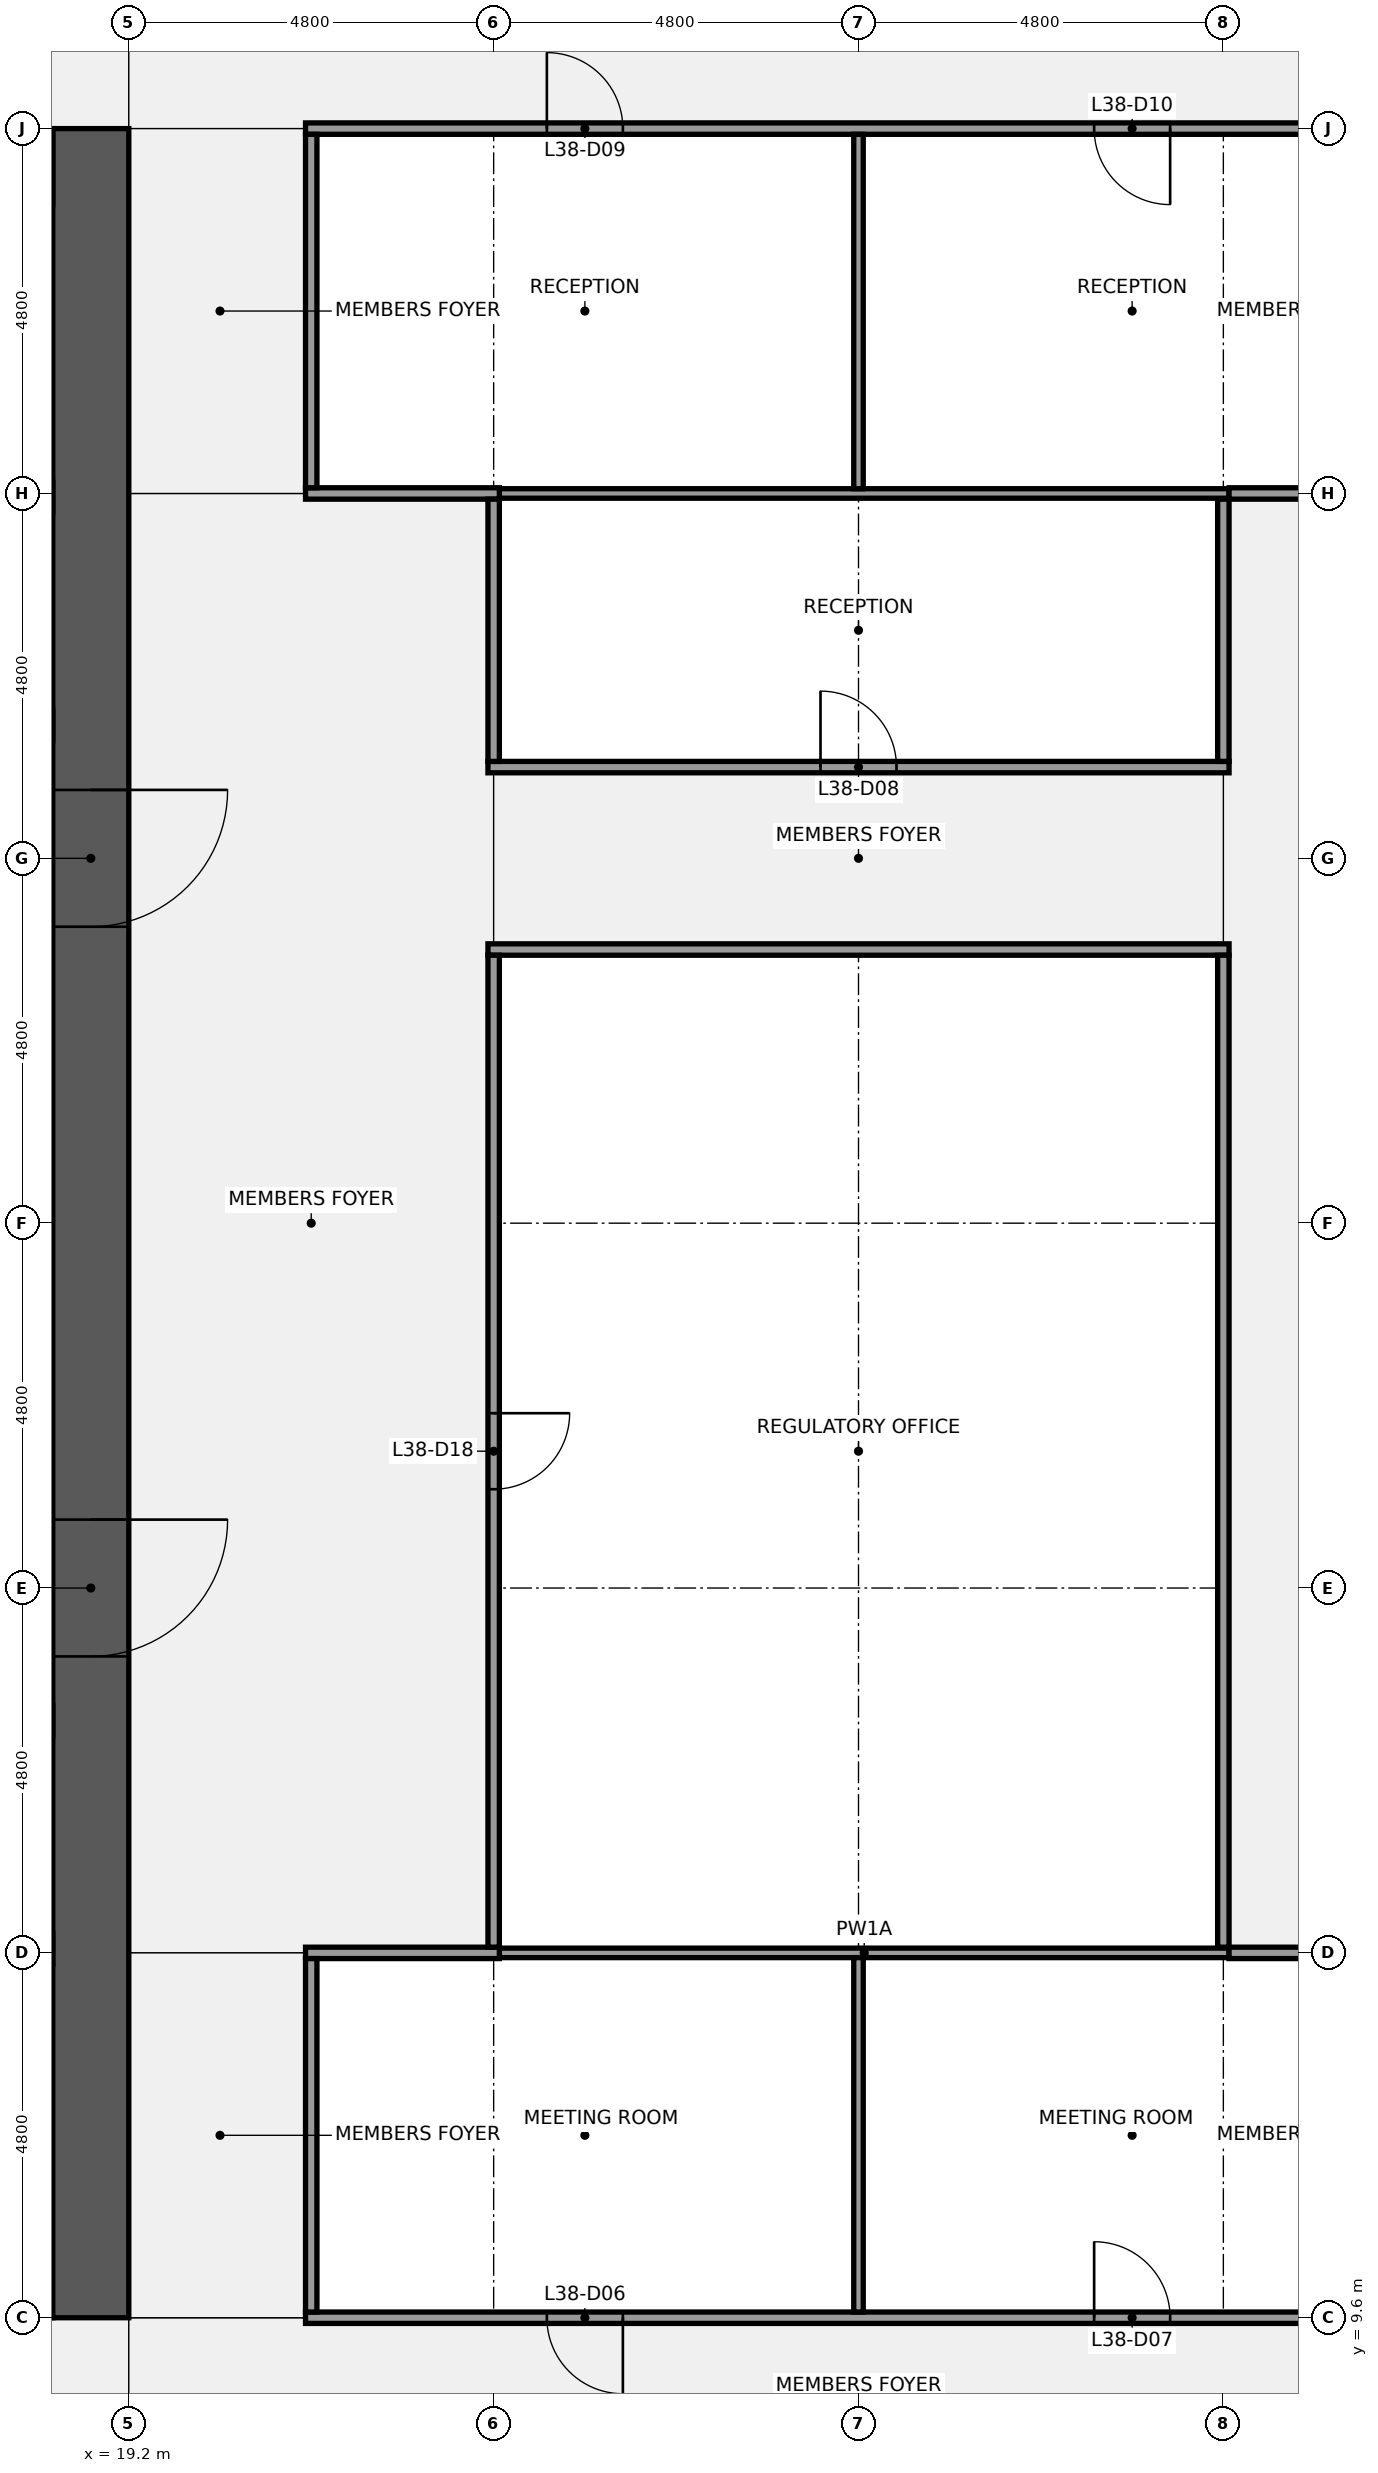
"""IFC4 building model, lengths in metres.
Left out: names, types, materials, properties, quantities, classifications, styles, units other than length and angle.
Written with IfcOpenShell. Run it as: python <this file> out.ifc"""

import sys

from ifc_helpers import new_model, si_unit, direction, frame, frame_2d, origin, place, context, subcontext, project, spatial, rectangle, extrude, element, fill, save


model = new_model("IFC4")
c1 = context("Model", 3, precision=1e-05, world=origin(), true_north=direction((0.0, 1.0)))
c2 = subcontext(c1, "Body", "Model", "MODEL_VIEW")
j1 = project(units=[si_unit("LENGTHUNIT", "METRE"), si_unit("PLANEANGLEUNIT", "RADIAN")], contexts=[c1])
p1 = place(None, origin())
s1 = spatial("IfcSite", under=j1, at=p1, CompositionType="ELEMENT")
p2 = place(p1, origin())
s2 = spatial("IfcBuilding", under=s1, at=p2, CompositionType="ELEMENT")
p3 = place(p2, frame((0.0, 0.0, 172.1)))
s3 = spatial("IfcBuildingStorey", under=s2, at=p3, CompositionType="ELEMENT", Elevation=172.1)
p4 = place(p3, frame((18.2, 10.1, 0.0), z_axis=(0.0, 0.0, 1.0), x_axis=(-1.0, 0.0, 0.0)))
e1 = element("IfcWall", 1, at=p4, inside=s3, PredefinedType="SHEAR", context=c2, shape_type="SweptSolid", body=[
    extrude(rectangle(XDim=8.6, YDim=1.0, at=frame_2d((4.3, 0.0))), origin(), (0.0, 0.0, 1.0), 3.7),
])
p5 = place(p4, frame((0.85, 0.0, 0.0)))
e2 = element("IfcOpeningElement", 2, at=p5, cuts=e1, PredefinedType="OPENING", context=c2, shape_type="SweptSolid", body=[
    extrude(rectangle(XDim=1.1, YDim=2.1, at=frame_2d((0.55, 1.05))), frame((0.0, 0.51, 0.0), z_axis=(0.0, -1.0, 0.0), x_axis=(1.0, 0.0, 0.0)), (0.0, 0.0, 1.0), 1.02),
])
p6 = place(p3, frame((18.7, 38.4, 0.0), z_axis=(0.0, 0.0, 1.0), x_axis=(0.0, -1.0, 0.0)))
e3 = element("IfcWall", 3, at=p6, inside=s3, PredefinedType="SHEAR", context=c2, shape_type="SweptSolid", body=[
    extrude(rectangle(XDim=28.8, YDim=1.0, at=frame_2d((14.4, 0.0))), origin(), (0.0, 0.0, 1.0), 3.7),
])
p7 = place(p6, frame((18.3, 0.0, 0.0)))
e4 = element("IfcOpeningElement", 4, at=p7, cuts=e3, PredefinedType="OPENING", context=c2, shape_type="SweptSolid", body=[
    extrude(rectangle(XDim=1.8, YDim=2.1, at=frame_2d((0.9, 1.05))), frame((0.0, 0.51, 0.0), z_axis=(0.0, -1.0, 0.0), x_axis=(1.0, 0.0, 0.0)), (0.0, 0.0, 1.0), 1.02),
])
p8 = place(p6, frame((8.7, 0.0, 0.0)))
e5 = element("IfcOpeningElement", 5, at=p8, cuts=e3, PredefinedType="OPENING", context=c2, shape_type="SweptSolid", body=[
    extrude(rectangle(XDim=1.8, YDim=2.1, at=frame_2d((0.9, 1.05))), frame((0.0, 0.51, 0.0), z_axis=(0.0, -1.0, 0.0), x_axis=(1.0, 0.0, 0.0)), (0.0, 0.0, 1.0), 1.02),
])
p9 = place(p3, frame((1.0, 14.45, 0.0), z_axis=(0.0, 0.0, 1.0), x_axis=(1.0, 0.0, 0.0)))
e6 = element("IfcWall", 6, at=p9, inside=s3, PredefinedType="SHEAR", context=c2, shape_type="SweptSolid", body=[
    extrude(rectangle(XDim=17.2, YDim=0.4, at=frame_2d((8.6, 0.0))), origin(), (0.0, 0.0, 1.0), 3.7),
])
p10 = place(p3, frame((1.0, 17.45, 0.0), z_axis=(0.0, 0.0, 1.0), x_axis=(1.0, 0.0, 0.0)))
e7 = element("IfcWall", 7, at=p10, inside=s3, PredefinedType="SHEAR", context=c2, shape_type="SweptSolid", body=[
    extrude(rectangle(XDim=17.2, YDim=0.4, at=frame_2d((8.6, 0.0))), origin(), (0.0, 0.0, 1.0), 3.7),
])
p11 = place(p10, frame((1.062, 0.0, 0.0)))
e8 = element("IfcOpeningElement", 8, at=p11, cuts=e7, PredefinedType="OPENING", context=c2, shape_type="SweptSolid", body=[
    extrude(rectangle(XDim=1.0, YDim=2.1, at=frame_2d((0.5, 1.05))), frame((0.0, 0.21, 0.0), z_axis=(0.0, -1.0, 0.0), x_axis=(1.0, 0.0, 0.0)), (0.0, 0.0, 1.0), 0.42),
])
p12 = place(p10, frame((6.9, 0.0, 0.0)))
e9 = element("IfcOpeningElement", 9, at=p12, cuts=e7, PredefinedType="OPENING", context=c2, shape_type="SweptSolid", body=[
    extrude(rectangle(XDim=1.0, YDim=2.1, at=frame_2d((0.5, 1.05))), frame((0.0, 0.21, 0.0), z_axis=(0.0, -1.0, 0.0), x_axis=(1.0, 0.0, 0.0)), (0.0, 0.0, 1.0), 0.42),
])
p13 = place(p10, frame((13.938, 0.0, 0.0)))
e10 = element("IfcOpeningElement", 10, at=p13, cuts=e7, PredefinedType="OPENING", context=c2, shape_type="SweptSolid", body=[
    extrude(rectangle(XDim=1.0, YDim=2.1, at=frame_2d((0.5, 1.05))), frame((0.0, 0.21, 0.0), z_axis=(0.0, -1.0, 0.0), x_axis=(1.0, 0.0, 0.0)), (0.0, 0.0, 1.0), 0.42),
])
p14 = place(p3, frame((1.0, 30.55, 0.0), z_axis=(0.0, 0.0, 1.0), x_axis=(1.0, 0.0, 0.0)))
e11 = element("IfcWall", 11, at=p14, inside=s3, PredefinedType="SHEAR", context=c2, shape_type="SweptSolid", body=[
    extrude(rectangle(XDim=17.2, YDim=0.4, at=frame_2d((8.6, 0.0))), origin(), (0.0, 0.0, 1.0), 3.7),
])
p15 = place(p14, frame((1.962, 0.0, 0.0)))
e12 = element("IfcOpeningElement", 12, at=p15, cuts=e11, PredefinedType="OPENING", context=c2, shape_type="SweptSolid", body=[
    extrude(rectangle(XDim=1.0, YDim=2.1, at=frame_2d((0.5, 1.05))), frame((0.0, 0.21, 0.0), z_axis=(0.0, -1.0, 0.0), x_axis=(1.0, 0.0, 0.0)), (0.0, 0.0, 1.0), 0.42),
])
p16 = place(p14, frame((5.7, 0.0, 0.0)))
e13 = element("IfcOpeningElement", 13, at=p16, cuts=e11, PredefinedType="OPENING", context=c2, shape_type="SweptSolid", body=[
    extrude(rectangle(XDim=1.0, YDim=2.1, at=frame_2d((0.5, 1.05))), frame((0.0, 0.21, 0.0), z_axis=(0.0, -1.0, 0.0), x_axis=(1.0, 0.0, 0.0)), (0.0, 0.0, 1.0), 0.42),
])
p17 = place(p14, frame((8.1, 0.0, 0.0)))
e14 = element("IfcOpeningElement", 14, at=p17, cuts=e11, PredefinedType="OPENING", context=c2, shape_type="SweptSolid", body=[
    extrude(rectangle(XDim=1.0, YDim=2.1, at=frame_2d((0.5, 1.05))), frame((0.0, 0.21, 0.0), z_axis=(0.0, -1.0, 0.0), x_axis=(1.0, 0.0, 0.0)), (0.0, 0.0, 1.0), 0.42),
])
p18 = place(p14, frame((13.038, 0.0, 0.0)))
e15 = element("IfcOpeningElement", 15, at=p18, cuts=e11, PredefinedType="OPENING", context=c2, shape_type="SweptSolid", body=[
    extrude(rectangle(XDim=1.0, YDim=2.1, at=frame_2d((0.5, 1.05))), frame((0.0, 0.21, 0.0), z_axis=(0.0, -1.0, 0.0), x_axis=(1.0, 0.0, 0.0)), (0.0, 0.0, 1.0), 0.42),
])
p19 = place(p3, frame((1.0, 33.55, 0.0), z_axis=(0.0, 0.0, 1.0), x_axis=(1.0, 0.0, 0.0)))
e16 = element("IfcWall", 16, at=p19, inside=s3, PredefinedType="SHEAR", context=c2, shape_type="SweptSolid", body=[
    extrude(rectangle(XDim=17.2, YDim=0.4, at=frame_2d((8.6, 0.0))), origin(), (0.0, 0.0, 1.0), 3.7),
])
p20 = place(p3, frame((21.525, 9.6, 0.0), z_axis=(0.0, 0.0, 1.0), x_axis=(1.0, 0.0, 0.0)))
e17 = element("IfcWall", 17, at=p20, inside=s3, PredefinedType="PARTITIONING", context=c2, shape_type="SweptSolid", body=[
    extrude(rectangle(XDim=14.55, YDim=0.15, at=frame_2d((7.275, 0.0))), origin(), (0.0, 0.0, 1.0), 2.709),
])
p21 = place(p20, frame((3.175, 0.0, 0.0)))
e18 = element("IfcOpeningElement", 18, at=p21, cuts=e17, PredefinedType="OPENING", context=c2, shape_type="SweptSolid", body=[
    extrude(rectangle(XDim=1.0, YDim=2.1, at=frame_2d((0.5, 1.05))), frame((0.0, 0.085, 0.0), z_axis=(0.0, -1.0, 0.0), x_axis=(1.0, 0.0, 0.0)), (0.0, 0.0, 1.0), 0.17),
])
p22 = place(p20, frame((10.375, 0.0, 0.0)))
e19 = element("IfcOpeningElement", 19, at=p22, cuts=e17, PredefinedType="OPENING", context=c2, shape_type="SweptSolid", body=[
    extrude(rectangle(XDim=1.0, YDim=2.1, at=frame_2d((0.5, 1.05))), frame((0.0, 0.085, 0.0), z_axis=(0.0, -1.0, 0.0), x_axis=(1.0, 0.0, 0.0)), (0.0, 0.0, 1.0), 0.17),
])
p23 = place(p3, frame((24.075, 14.4, 0.0), z_axis=(0.0, 0.0, 1.0), x_axis=(1.0, 0.0, 0.0)))
e20 = element("IfcWall", 20, at=p23, inside=s3, PredefinedType="PARTITIONING", context=c2, shape_type="SweptSolid", body=[
    extrude(rectangle(XDim=9.6, YDim=0.125, at=frame_2d((4.8, 0.0))), origin(), (0.0, 0.0, 1.0), 2.709),
])
p24 = place(p3, frame((21.525, 14.4, 0.0), z_axis=(0.0, 0.0, 1.0), x_axis=(1.0, 0.0, 0.0)))
e21 = element("IfcWall", 21, at=p24, inside=s3, PredefinedType="PARTITIONING", context=c2, shape_type="SweptSolid", body=[
    extrude(rectangle(XDim=2.55, YDim=0.15, at=frame_2d((1.275, 0.0))), origin(), (0.0, 0.0, 1.0), 2.709),
])
p25 = place(p3, frame((33.675, 14.4, 0.0), z_axis=(0.0, 0.0, 1.0), x_axis=(1.0, 0.0, 0.0)))
e22 = element("IfcWall", 22, at=p25, inside=s3, PredefinedType="PARTITIONING", context=c2, shape_type="SweptSolid", body=[
    extrude(rectangle(XDim=2.4, YDim=0.15, at=frame_2d((1.2, 0.0))), origin(), (0.0, 0.0, 1.0), 2.709),
])
p26 = place(p3, frame((23.925, 27.6, 0.0), z_axis=(0.0, 0.0, 1.0), x_axis=(1.0, 0.0, 0.0)))
e23 = element("IfcWall", 23, at=p26, inside=s3, PredefinedType="PARTITIONING", context=c2, shape_type="SweptSolid", body=[
    extrude(rectangle(XDim=9.75, YDim=0.15, at=frame_2d((4.875, 0.0))), origin(), (0.0, 0.0, 1.0), 2.709),
])
p27 = place(p3, frame((23.925, 30.0, 0.0), z_axis=(0.0, 0.0, 1.0), x_axis=(1.0, 0.0, 0.0)))
e24 = element("IfcWall", 24, at=p27, inside=s3, PredefinedType="PARTITIONING", context=c2, shape_type="SweptSolid", body=[
    extrude(rectangle(XDim=9.75, YDim=0.15, at=frame_2d((4.875, 0.0))), origin(), (0.0, 0.0, 1.0), 2.709),
])
p28 = place(p27, frame((4.375, 0.0, 0.0)))
e25 = element("IfcOpeningElement", 25, at=p28, cuts=e24, PredefinedType="OPENING", context=c2, shape_type="SweptSolid", body=[
    extrude(rectangle(XDim=1.0, YDim=2.1, at=frame_2d((0.5, 1.05))), frame((0.0, 0.085, 0.0), z_axis=(0.0, -1.0, 0.0), x_axis=(1.0, 0.0, 0.0)), (0.0, 0.0, 1.0), 0.17),
])
p29 = place(p3, frame((24.075, 33.6, 0.0), z_axis=(0.0, 0.0, 1.0), x_axis=(1.0, 0.0, 0.0)))
e26 = element("IfcWall", 26, at=p29, inside=s3, PredefinedType="PARTITIONING", context=c2, shape_type="SweptSolid", body=[
    extrude(rectangle(XDim=9.6, YDim=0.125, at=frame_2d((4.8, 0.0))), origin(), (0.0, 0.0, 1.0), 2.709),
])
p30 = place(p3, frame((21.525, 33.6, 0.0), z_axis=(0.0, 0.0, 1.0), x_axis=(1.0, 0.0, 0.0)))
e27 = element("IfcWall", 27, at=p30, inside=s3, PredefinedType="PARTITIONING", context=c2, shape_type="SweptSolid", body=[
    extrude(rectangle(XDim=2.55, YDim=0.15, at=frame_2d((1.275, 0.0))), origin(), (0.0, 0.0, 1.0), 2.709),
])
p31 = place(p3, frame((33.675, 33.6, 0.0), z_axis=(0.0, 0.0, 1.0), x_axis=(1.0, 0.0, 0.0)))
e28 = element("IfcWall", 28, at=p31, inside=s3, PredefinedType="PARTITIONING", context=c2, shape_type="SweptSolid", body=[
    extrude(rectangle(XDim=2.4, YDim=0.15, at=frame_2d((1.2, 0.0))), origin(), (0.0, 0.0, 1.0), 2.709),
])
p32 = place(p3, frame((21.525, 38.4, 0.0), z_axis=(0.0, 0.0, 1.0), x_axis=(1.0, 0.0, 0.0)))
e29 = element("IfcWall", 29, at=p32, inside=s3, PredefinedType="PARTITIONING", context=c2, shape_type="SweptSolid", body=[
    extrude(rectangle(XDim=14.55, YDim=0.15, at=frame_2d((7.275, 0.0))), origin(), (0.0, 0.0, 1.0), 2.709),
])
p33 = place(p32, frame((3.175, 0.0, 0.0)))
e30 = element("IfcOpeningElement", 30, at=p33, cuts=e29, PredefinedType="OPENING", context=c2, shape_type="SweptSolid", body=[
    extrude(rectangle(XDim=1.0, YDim=2.1, at=frame_2d((0.5, 1.05))), frame((0.0, 0.085, 0.0), z_axis=(0.0, -1.0, 0.0), x_axis=(1.0, 0.0, 0.0)), (0.0, 0.0, 1.0), 0.17),
])
p34 = place(p32, frame((10.375, 0.0, 0.0)))
e31 = element("IfcOpeningElement", 31, at=p34, cuts=e29, PredefinedType="OPENING", context=c2, shape_type="SweptSolid", body=[
    extrude(rectangle(XDim=1.0, YDim=2.1, at=frame_2d((0.5, 1.05))), frame((0.0, 0.085, 0.0), z_axis=(0.0, -1.0, 0.0), x_axis=(1.0, 0.0, 0.0)), (0.0, 0.0, 1.0), 0.17),
])
for number, where, z_axis, x_axis in (
    (32, (21.6, 9.675, 0.0), (0.0, 0.0, 1.0), (0.0, 1.0, 0.0)),
    (33, (21.6, 33.675, 0.0), (0.0, 0.0, 1.0), (0.0, 1.0, 0.0)),
):
    element("IfcWall", number, at=place(p3, frame(where, z_axis=z_axis, x_axis=x_axis)), inside=s3, PredefinedType="PARTITIONING", context=c2, shape_type="SweptSolid", body=[
        extrude(rectangle(XDim=4.65, YDim=0.15, at=frame_2d((2.325, 0.0))), origin(), (0.0, 0.0, 1.0), 2.709),
    ])
p35 = place(p3, frame((24.0, 14.475, 0.0), z_axis=(0.0, 0.0, 1.0), x_axis=(0.0, 1.0, 0.0)))
e34 = element("IfcWall", 34, at=p35, inside=s3, PredefinedType="PARTITIONING", context=c2, shape_type="SweptSolid", body=[
    extrude(rectangle(XDim=13.05, YDim=0.15, at=frame_2d((6.525, 0.0))), origin(), (0.0, 0.0, 1.0), 2.709),
])
p36 = place(p35, frame((6.025, 0.0, 0.0)))
e35 = element("IfcOpeningElement", 35, at=p36, cuts=e34, PredefinedType="OPENING", context=c2, shape_type="SweptSolid", body=[
    extrude(rectangle(XDim=1.0, YDim=2.1, at=frame_2d((0.5, 1.05))), frame((0.0, 0.085, 0.0), z_axis=(0.0, -1.0, 0.0), x_axis=(1.0, 0.0, 0.0)), (0.0, 0.0, 1.0), 0.17),
])
p37 = place(p3, frame((24.0, 30.075, 0.0), z_axis=(0.0, 0.0, 1.0), x_axis=(0.0, 1.0, 0.0)))
e36 = element("IfcWall", 36, at=p37, inside=s3, PredefinedType="PARTITIONING", context=c2, shape_type="SweptSolid", body=[
    extrude(rectangle(XDim=3.45, YDim=0.15, at=frame_2d((1.725, 0.0))), origin(), (0.0, 0.0, 1.0), 2.709),
])
for number, where, z_axis, x_axis in (
    (37, (28.8, 9.675, 0.0), (0.0, 0.0, 1.0), (0.0, 1.0, 0.0)),
    (38, (28.8, 33.663, 0.0), (0.0, 0.0, 1.0), (0.0, 1.0, 0.0)),
):
    element("IfcWall", number, at=place(p3, frame(where, z_axis=z_axis, x_axis=x_axis)), inside=s3, PredefinedType="PARTITIONING", context=c2, shape_type="SweptSolid", body=[
        extrude(rectangle(XDim=4.662, YDim=0.125, at=frame_2d((2.331, 0.0))), origin(), (0.0, 0.0, 1.0), 2.709),
    ])
p38 = place(p3, frame((33.6, 14.475, 0.0), z_axis=(0.0, 0.0, 1.0), x_axis=(0.0, 1.0, 0.0)))
e39 = element("IfcWall", 39, at=p38, inside=s3, PredefinedType="PARTITIONING", context=c2, shape_type="SweptSolid", body=[
    extrude(rectangle(XDim=13.05, YDim=0.15, at=frame_2d((6.525, 0.0))), origin(), (0.0, 0.0, 1.0), 2.709),
])
p39 = place(p3, frame((33.6, 30.075, 0.0), z_axis=(0.0, 0.0, 1.0), x_axis=(0.0, 1.0, 0.0)))
e40 = element("IfcWall", 40, at=p39, inside=s3, PredefinedType="PARTITIONING", context=c2, shape_type="SweptSolid", body=[
    extrude(rectangle(XDim=3.45, YDim=0.15, at=frame_2d((1.725, 0.0))), origin(), (0.0, 0.0, 1.0), 2.709),
])
p40 = place(p7, origin())
e41 = element("IfcDoor", 41, at=p40, inside=s3, OperationType="DOUBLE_DOOR_SINGLE_SWING", PredefinedType="DOOR", context=c2, shape_type="SweptSolid", body=[
    extrude(rectangle(XDim=1.8, YDim=2.1, at=frame_2d((0.9, 1.05))), frame((0.0, 0.025, 0.0), z_axis=(0.0, -1.0, 0.0), x_axis=(1.0, 0.0, 0.0)), (0.0, 0.0, 1.0), 0.05),
])
fill(e4, e41)
p41 = place(p8, origin())
e42 = element("IfcDoor", 42, at=p41, inside=s3, OperationType="DOUBLE_DOOR_SINGLE_SWING", PredefinedType="DOOR", context=c2, shape_type="SweptSolid", body=[
    extrude(rectangle(XDim=1.8, YDim=2.1, at=frame_2d((0.9, 1.05))), frame((0.0, 0.025, 0.0), z_axis=(0.0, -1.0, 0.0), x_axis=(1.0, 0.0, 0.0)), (0.0, 0.0, 1.0), 0.05),
])
fill(e5, e42)
p42 = place(p21, origin())
e43 = element("IfcDoor", 43, at=p42, inside=s3, OperationType="SINGLE_SWING_RIGHT", PredefinedType="DOOR", context=c2, shape_type="SweptSolid", body=[
    extrude(rectangle(XDim=1.0, YDim=2.1, at=frame_2d((0.5, 1.05))), frame((0.0, 0.025, 0.0), z_axis=(0.0, -1.0, 0.0), x_axis=(1.0, 0.0, 0.0)), (0.0, 0.0, 1.0), 0.05),
])
fill(e18, e43)
p43 = place(p22, origin())
e44 = element("IfcDoor", 44, at=p43, inside=s3, OperationType="SINGLE_SWING_LEFT", PredefinedType="DOOR", context=c2, shape_type="SweptSolid", body=[
    extrude(rectangle(XDim=1.0, YDim=2.1, at=frame_2d((0.5, 1.05))), frame((0.0, 0.025, 0.0), z_axis=(0.0, -1.0, 0.0), x_axis=(1.0, 0.0, 0.0)), (0.0, 0.0, 1.0), 0.05),
])
fill(e19, e44)
p44 = place(p28, origin())
e45 = element("IfcDoor", 45, at=p44, inside=s3, OperationType="SINGLE_SWING_LEFT", PredefinedType="DOOR", context=c2, shape_type="SweptSolid", body=[
    extrude(rectangle(XDim=1.0, YDim=2.1, at=frame_2d((0.5, 1.05))), frame((0.0, 0.025, 0.0), z_axis=(0.0, -1.0, 0.0), x_axis=(1.0, 0.0, 0.0)), (0.0, 0.0, 1.0), 0.05),
])
fill(e25, e45)
p45 = place(p33, origin())
e46 = element("IfcDoor", 46, at=p45, inside=s3, OperationType="SINGLE_SWING_LEFT", PredefinedType="DOOR", context=c2, shape_type="SweptSolid", body=[
    extrude(rectangle(XDim=1.0, YDim=2.1, at=frame_2d((0.5, 1.05))), frame((0.0, 0.025, 0.0), z_axis=(0.0, -1.0, 0.0), x_axis=(1.0, 0.0, 0.0)), (0.0, 0.0, 1.0), 0.05),
])
fill(e30, e46)
p46 = place(p34, origin())
e47 = element("IfcDoor", 47, at=p46, inside=s3, OperationType="SINGLE_SWING_RIGHT", PredefinedType="DOOR", context=c2, shape_type="SweptSolid", body=[
    extrude(rectangle(XDim=1.0, YDim=2.1, at=frame_2d((0.5, 1.05))), frame((0.0, 0.025, 0.0), z_axis=(0.0, -1.0, 0.0), x_axis=(1.0, 0.0, 0.0)), (0.0, 0.0, 1.0), 0.05),
])
fill(e31, e47)
p47 = place(p36, origin())
e48 = element("IfcDoor", 48, at=p47, inside=s3, OperationType="SINGLE_SWING_RIGHT", PredefinedType="DOOR", context=c2, shape_type="SweptSolid", body=[
    extrude(rectangle(XDim=1.0, YDim=2.1, at=frame_2d((0.5, 1.05))), frame((0.0, 0.025, 0.0), z_axis=(0.0, -1.0, 0.0), x_axis=(1.0, 0.0, 0.0)), (0.0, 0.0, 1.0), 0.05),
])
fill(e35, e48)
save(model, sys.argv[1])
